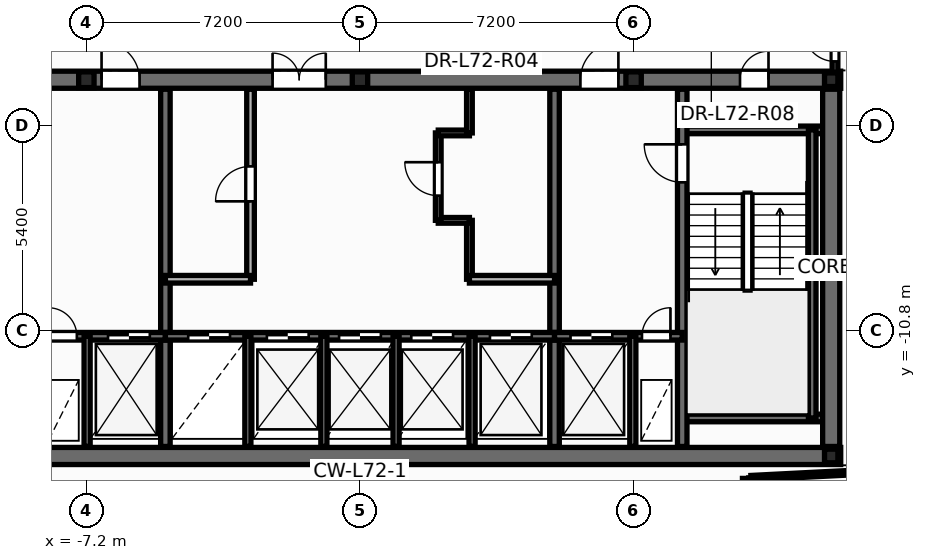
"""IFC4 building model, lengths in metres.
Left out: names, types, materials, properties, quantities, classifications, styles, units other than length and angle.
Written with IfcOpenShell. Run it as: python <this file> out.ifc"""

import sys

from ifc_helpers import new_model, si_unit, direction, frame, frame_2d, origin, origin_2d, place, context, subcontext, project, spatial, rectangle, hollow_circle, i_section, extrude, element, fill, save


model = new_model("IFC4")
c1 = context("Model", 3, precision=1e-05, world=origin(), true_north=direction((0.0, 1.0)))
c2 = subcontext(c1, "Body", "Model", "MODEL_VIEW")
j1 = project(units=[si_unit("LENGTHUNIT", "METRE"), si_unit("PLANEANGLEUNIT", "RADIAN")], contexts=[c1])
p1 = place(None, origin())
s1 = spatial("IfcSite", under=j1, at=p1, CompositionType="ELEMENT")
p2 = place(p1, origin())
s2 = spatial("IfcBuilding", under=s1, at=p2, CompositionType="ELEMENT")
p3 = place(p2, frame((0.0, 0.0, 274.2)))
s3 = spatial("IfcBuildingStorey", under=s2, at=p3, CompositionType="ELEMENT", Elevation=274.2)
p4 = place(p3, frame((10.293, -14.919, 0.0), z_axis=(0.0, 0.0, 1.0), x_axis=(1.0, 0.0, 0.0)))
e1 = element("IfcColumn", 1, at=p4, inside=s3, PredefinedType="COLUMN", context=c2, shape_type="SweptSolid", body=[
    extrude(hollow_circle(Radius=0.229, WallThickness=0.016, at=origin_2d()), origin(), (0.0, 0.0, 1.0), 3.6),
])
for number, where, z_axis, x_axis in (
    (2, (12.4, -14.1, 0.0), (0.0, 0.0, 1.0), (1.0, 0.0, 0.0)),
    (3, (12.4, -4.2, 0.0), (0.0, 0.0, 1.0), (1.0, 0.0, 0.0)),
):
    element("IfcColumn", number, at=place(p3, frame(where, z_axis=z_axis, x_axis=x_axis)), inside=s3, PredefinedType="COLUMN", context=c2, shape_type="SweptSolid", body=[
        extrude(i_section(OverallWidth=0.352, OverallDepth=0.359, WebThickness=0.018, FlangeThickness=0.026, at=origin_2d()), origin(), (0.0, 0.0, 1.0), 3.6),
    ])
for number, where, z_axis, x_axis in (
    (4, (-7.2, -4.2, 0.0), (0.0, 0.0, 1.0), (1.0, 0.0, 0.0)),
    (5, (0.0, -4.2, 0.0), (0.0, 0.0, 1.0), (1.0, 0.0, 0.0)),
    (6, (7.2, -4.2, 0.0), (0.0, 0.0, 1.0), (1.0, 0.0, 0.0)),
):
    element("IfcColumn", number, at=place(p3, frame(where, z_axis=z_axis, x_axis=x_axis)), inside=s3, PredefinedType="PILASTER", context=c2, shape_type="SweptSolid", body=[
        extrude(i_section(OverallWidth=0.405, OverallDepth=0.414, WebThickness=0.022, FlangeThickness=0.032, at=origin_2d()), origin(), (0.0, 0.0, 1.0), 3.6),
    ])
p5 = place(p3, frame((2.88, -9.45, 0.0), z_axis=(0.0, 0.0, 1.0), x_axis=(0.0, 1.0, 0.0)))
e7 = element("IfcWall", 7, at=p5, inside=s3, PredefinedType="PARTITIONING", context=c2, shape_type="SweptSolid", body=[
    extrude(rectangle(XDim=1.55, YDim=0.15, at=frame_2d((0.775, 0.0))), origin(), (0.0, 0.0, 1.0), 3.345),
])
p6 = place(p3, frame((2.06, -7.9, 0.0), z_axis=(0.0, 0.0, 1.0), x_axis=(1.0, 0.0, 0.0)))
e8 = element("IfcWall", 8, at=p6, inside=s3, PredefinedType="PARTITIONING", context=c2, shape_type="SweptSolid", body=[
    extrude(rectangle(XDim=0.82, YDim=0.15, at=frame_2d((0.41, 0.0))), origin(), (0.0, 0.0, 1.0), 3.345),
])
p7 = place(p3, frame((2.06, -7.9, 0.0), z_axis=(0.0, 0.0, 1.0), x_axis=(0.0, 1.0, 0.0)))
e9 = element("IfcWall", 9, at=p7, inside=s3, PredefinedType="PARTITIONING", context=c2, shape_type="SweptSolid", body=[
    extrude(rectangle(XDim=2.3, YDim=0.15, at=frame_2d((1.15, 0.0))), origin(), (0.0, 0.0, 1.0), 3.345),
])
p8 = place(p7, frame((0.65, 0.0, 0.0)))
e10 = element("IfcOpeningElement", 10, at=p8, cuts=e9, PredefinedType="OPENING", context=c2, shape_type="SweptSolid", body=[
    extrude(rectangle(XDim=0.886, YDim=2.104, at=frame_2d((0.44, 1.052))), frame((0.0, 0.085, 0.0), z_axis=(0.0, -1.0, 0.0), x_axis=(1.0, 0.0, 0.0)), (0.0, 0.0, 1.0), 0.17),
])
p9 = place(p3, frame((2.06, -5.6, 0.0), z_axis=(0.0, 0.0, 1.0), x_axis=(1.0, 0.0, 0.0)))
e11 = element("IfcWall", 11, at=p9, inside=s3, PredefinedType="PARTITIONING", context=c2, shape_type="SweptSolid", body=[
    extrude(rectangle(XDim=0.82, YDim=0.15, at=frame_2d((0.41, 0.0))), origin(), (0.0, 0.0, 1.0), 3.345),
])
p10 = place(p3, frame((2.88, -5.6, 0.0), z_axis=(0.0, 0.0, 1.0), x_axis=(0.0, 1.0, 0.0)))
e12 = element("IfcWall", 12, at=p10, inside=s3, PredefinedType="PARTITIONING", context=c2, shape_type="SweptSolid", body=[
    extrude(rectangle(XDim=1.15, YDim=0.15, at=frame_2d((0.575, 0.0))), origin(), (0.0, 0.0, 1.0), 3.345),
])
p11 = place(p3, frame((-12.65, -14.1, 0.0), z_axis=(0.0, 0.0, 1.0), x_axis=(1.0, 0.0, 0.0)))
e13 = element("IfcWall", 13, at=p11, inside=s3, PredefinedType="SHEAR", context=c2, shape_type="SweptSolid", body=[
    extrude(rectangle(XDim=25.3, YDim=0.45, at=frame_2d((12.65, 0.0))), origin(), (0.0, 0.0, 1.0), 3.6),
])
p12 = place(p3, frame((-12.65, -4.2, 0.0), z_axis=(0.0, 0.0, 1.0), x_axis=(1.0, 0.0, 0.0)))
e14 = element("IfcWall", 14, at=p12, inside=s3, PredefinedType="SHEAR", context=c2, shape_type="SweptSolid", body=[
    extrude(rectangle(XDim=25.3, YDim=0.45, at=frame_2d((12.65, 0.0))), origin(), (0.0, 0.0, 1.0), 3.6),
])
p13 = place(p12, frame((1.85, 0.0, 0.0)))
e15 = element("IfcOpeningElement", 15, at=p13, cuts=e14, PredefinedType="OPENING", context=c2, shape_type="SweptSolid", body=[
    extrude(rectangle(XDim=0.756, YDim=2.054, at=frame_2d((0.375, 1.027))), frame((0.0, 0.235, 0.0), z_axis=(0.0, -1.0, 0.0), x_axis=(1.0, 0.0, 0.0)), (0.0, 0.0, 1.0), 0.47),
])
p14 = place(p12, frame((22.65, 0.0, 0.0)))
e16 = element("IfcOpeningElement", 16, at=p14, cuts=e14, PredefinedType="OPENING", context=c2, shape_type="SweptSolid", body=[
    extrude(rectangle(XDim=0.756, YDim=2.054, at=frame_2d((0.375, 1.027))), frame((0.0, 0.235, 0.0), z_axis=(0.0, -1.0, 0.0), x_axis=(1.0, 0.0, 0.0)), (0.0, 0.0, 1.0), 0.47),
])
p15 = place(p12, frame((5.85, 0.0, 0.0)))
e17 = element("IfcOpeningElement", 17, at=p15, cuts=e14, PredefinedType="OPENING", context=c2, shape_type="SweptSolid", body=[
    extrude(rectangle(XDim=1.006, YDim=2.104, at=frame_2d((0.5, 1.052))), frame((0.0, 0.235, 0.0), z_axis=(0.0, -1.0, 0.0), x_axis=(1.0, 0.0, 0.0)), (0.0, 0.0, 1.0), 0.47),
])
p16 = place(p12, frame((10.35, 0.0, 0.0)))
e18 = element("IfcOpeningElement", 18, at=p16, cuts=e14, PredefinedType="OPENING", context=c2, shape_type="SweptSolid", body=[
    extrude(rectangle(XDim=1.406, YDim=2.154, at=frame_2d((0.7, 1.077))), frame((0.0, 0.235, 0.0), z_axis=(0.0, -1.0, 0.0), x_axis=(1.0, 0.0, 0.0)), (0.0, 0.0, 1.0), 0.47),
])
p17 = place(p12, frame((18.45, 0.0, 0.0)))
e19 = element("IfcOpeningElement", 19, at=p17, cuts=e14, PredefinedType="OPENING", context=c2, shape_type="SweptSolid", body=[
    extrude(rectangle(XDim=1.006, YDim=2.104, at=frame_2d((0.5, 1.052))), frame((0.0, 0.235, 0.0), z_axis=(0.0, -1.0, 0.0), x_axis=(1.0, 0.0, 0.0)), (0.0, 0.0, 1.0), 0.47),
])
for number, where, z_axis, x_axis in (
    (20, (8.48, -5.52, 0.0), (0.0, 0.0, 1.0), (1.0, 0.0, 0.0)),
    (21, (8.48, -13.1, 0.0), (0.0, 0.0, 1.0), (1.0, 0.0, 0.0)),
):
    element("IfcWall", number, at=place(p3, frame(where, z_axis=z_axis, x_axis=x_axis)), inside=s3, PredefinedType="SOLIDWALL", context=c2, shape_type="SweptSolid", body=[
        extrude(rectangle(XDim=3.87, YDim=0.2, at=frame_2d((1.935, 0.0))), origin(), (0.0, 0.0, 1.0), 3.6),
    ])
p18 = place(p3, frame((11.9, -13.1, 0.0), z_axis=(0.0, 0.0, 1.0), x_axis=(0.0, 1.0, 0.0)))
e22 = element("IfcWall", 22, at=p18, inside=s3, PredefinedType="SOLIDWALL", context=c2, shape_type="SweptSolid", body=[
    extrude(rectangle(XDim=7.58, YDim=0.2, at=frame_2d((3.79, 0.0))), origin(), (0.0, 0.0, 1.0), 3.6),
])
p19 = place(p3, frame((8.48, -13.85, 0.0), z_axis=(0.0, 0.0, 1.0), x_axis=(0.0, 1.0, 0.0)))
e23 = element("IfcWall", 23, at=p19, inside=s3, PredefinedType="SHEAR", context=c2, shape_type="SweptSolid", body=[
    extrude(rectangle(XDim=9.4, YDim=0.25, at=frame_2d((4.7, 0.0))), origin(), (0.0, 0.0, 1.0), 3.6),
])
p20 = place(p19, frame((6.95, 0.0, 0.0)))
e24 = element("IfcOpeningElement", 24, at=p20, cuts=e23, PredefinedType="OPENING", context=c2, shape_type="SweptSolid", body=[
    extrude(rectangle(XDim=1.006, YDim=2.104, at=frame_2d((0.5, 1.052))), frame((0.0, 0.135, 0.0), z_axis=(0.0, -1.0, 0.0), x_axis=(1.0, 0.0, 0.0)), (0.0, 0.0, 1.0), 0.27),
])
for number, where, z_axis, x_axis in (
    (25, (-5.12, -13.85, 0.0), (0.0, 0.0, 1.0), (0.0, 1.0, 0.0)),
    (26, (5.12, -13.85, 0.0), (0.0, 0.0, 1.0), (0.0, 1.0, 0.0)),
):
    element("IfcWall", number, at=place(p3, frame(where, z_axis=z_axis, x_axis=x_axis)), inside=s3, PredefinedType="SHEAR", context=c2, shape_type="SweptSolid", body=[
        extrude(rectangle(XDim=9.4, YDim=0.25, at=frame_2d((4.7, 0.0))), origin(), (0.0, 0.0, 1.0), 3.6),
    ])
p21 = place(p3, frame((-8.48, -10.95, 0.0), z_axis=(0.0, 0.0, 1.0), x_axis=(1.0, 0.0, 0.0)))
e27 = element("IfcWall", 27, at=p21, inside=s3, PredefinedType="SOLIDWALL", context=c2, shape_type="SweptSolid", body=[
    extrude(rectangle(XDim=3.36, YDim=0.2, at=frame_2d((1.68, 0.0))), origin(), (0.0, 0.0, 1.0), 3.6),
])
p22 = place(p21, frame((0.28, 0.0, 0.0)))
e28 = element("IfcOpeningElement", 28, at=p22, cuts=e27, PredefinedType="OPENING", context=c2, shape_type="SweptSolid", body=[
    extrude(rectangle(XDim=0.756, YDim=2.054, at=frame_2d((0.375, 1.027))), frame((0.0, 0.11, 0.0), z_axis=(0.0, -1.0, 0.0), x_axis=(1.0, 0.0, 0.0)), (0.0, 0.0, 1.0), 0.22),
])
p23 = place(p21, frame((1.85, 0.0, 0.0)))
e29 = element("IfcOpeningElement", 29, at=p23, cuts=e27, PredefinedType="OPENING", context=c2, shape_type="SweptSolid", body=[
    extrude(rectangle(XDim=1.106, YDim=2.104, at=frame_2d((0.55, 1.052))), frame((0.0, 0.11, 0.0), z_axis=(0.0, -1.0, 0.0), x_axis=(1.0, 0.0, 0.0)), (0.0, 0.0, 1.0), 0.22),
])
p24 = place(p3, frame((-5.12, -10.95, 0.0), z_axis=(0.0, 0.0, 1.0), x_axis=(1.0, 0.0, 0.0)))
e30 = element("IfcWall", 30, at=p24, inside=s3, PredefinedType="SOLIDWALL", context=c2, shape_type="SweptSolid", body=[
    extrude(rectangle(XDim=10.24, YDim=0.2, at=frame_2d((5.12, 0.0))), origin(), (0.0, 0.0, 1.0), 3.6),
])
p25 = place(p24, frame((0.6, 0.0, 0.0)))
e31 = element("IfcOpeningElement", 31, at=p25, cuts=e30, PredefinedType="OPENING", context=c2, shape_type="SweptSolid", body=[
    extrude(rectangle(XDim=1.106, YDim=2.104, at=frame_2d((0.55, 1.052))), frame((0.0, 0.11, 0.0), z_axis=(0.0, -1.0, 0.0), x_axis=(1.0, 0.0, 0.0)), (0.0, 0.0, 1.0), 0.22),
])
p26 = place(p24, frame((2.67, 0.0, 0.0)))
e32 = element("IfcOpeningElement", 32, at=p26, cuts=e30, PredefinedType="OPENING", context=c2, shape_type="SweptSolid", body=[
    extrude(rectangle(XDim=1.106, YDim=2.104, at=frame_2d((0.55, 1.052))), frame((0.0, 0.11, 0.0), z_axis=(0.0, -1.0, 0.0), x_axis=(1.0, 0.0, 0.0)), (0.0, 0.0, 1.0), 0.22),
])
p27 = place(p24, frame((4.57, 0.0, 0.0)))
e33 = element("IfcOpeningElement", 33, at=p27, cuts=e30, PredefinedType="OPENING", context=c2, shape_type="SweptSolid", body=[
    extrude(rectangle(XDim=1.106, YDim=2.104, at=frame_2d((0.55, 1.052))), frame((0.0, 0.11, 0.0), z_axis=(0.0, -1.0, 0.0), x_axis=(1.0, 0.0, 0.0)), (0.0, 0.0, 1.0), 0.22),
])
p28 = place(p24, frame((6.47, 0.0, 0.0)))
e34 = element("IfcOpeningElement", 34, at=p28, cuts=e30, PredefinedType="OPENING", context=c2, shape_type="SweptSolid", body=[
    extrude(rectangle(XDim=1.106, YDim=2.104, at=frame_2d((0.55, 1.052))), frame((0.0, 0.11, 0.0), z_axis=(0.0, -1.0, 0.0), x_axis=(1.0, 0.0, 0.0)), (0.0, 0.0, 1.0), 0.22),
])
p29 = place(p24, frame((8.54, 0.0, 0.0)))
e35 = element("IfcOpeningElement", 35, at=p29, cuts=e30, PredefinedType="OPENING", context=c2, shape_type="SweptSolid", body=[
    extrude(rectangle(XDim=1.106, YDim=2.104, at=frame_2d((0.55, 1.052))), frame((0.0, 0.11, 0.0), z_axis=(0.0, -1.0, 0.0), x_axis=(1.0, 0.0, 0.0)), (0.0, 0.0, 1.0), 0.22),
])
p30 = place(p3, frame((5.12, -10.95, 0.0), z_axis=(0.0, 0.0, 1.0), x_axis=(1.0, 0.0, 0.0)))
e36 = element("IfcWall", 36, at=p30, inside=s3, PredefinedType="SOLIDWALL", context=c2, shape_type="SweptSolid", body=[
    extrude(rectangle(XDim=3.36, YDim=0.2, at=frame_2d((1.68, 0.0))), origin(), (0.0, 0.0, 1.0), 3.6),
])
p31 = place(p30, frame((0.42, 0.0, 0.0)))
e37 = element("IfcOpeningElement", 37, at=p31, cuts=e36, PredefinedType="OPENING", context=c2, shape_type="SweptSolid", body=[
    extrude(rectangle(XDim=1.106, YDim=2.104, at=frame_2d((0.55, 1.052))), frame((0.0, 0.11, 0.0), z_axis=(0.0, -1.0, 0.0), x_axis=(1.0, 0.0, 0.0)), (0.0, 0.0, 1.0), 0.22),
])
p32 = place(p30, frame((2.3, 0.0, 0.0)))
e38 = element("IfcOpeningElement", 38, at=p32, cuts=e36, PredefinedType="OPENING", context=c2, shape_type="SweptSolid", body=[
    extrude(rectangle(XDim=0.756, YDim=2.054, at=frame_2d((0.375, 1.027))), frame((0.0, 0.11, 0.0), z_axis=(0.0, -1.0, 0.0), x_axis=(1.0, 0.0, 0.0)), (0.0, 0.0, 1.0), 0.22),
])
for number, where, z_axis, x_axis in (
    (39, (-7.18, -13.85, 0.0), (0.0, 0.0, 1.0), (0.0, 1.0, 0.0)),
    (40, (7.18, -13.85, 0.0), (0.0, 0.0, 1.0), (0.0, 1.0, 0.0)),
    (41, (-2.95, -13.85, 0.0), (0.0, 0.0, 1.0), (0.0, 1.0, 0.0)),
    (42, (2.95, -13.85, 0.0), (0.0, 0.0, 1.0), (0.0, 1.0, 0.0)),
):
    element("IfcWall", number, at=place(p3, frame(where, z_axis=z_axis, x_axis=x_axis)), inside=s3, PredefinedType="PARTITIONING", context=c2, shape_type="SweptSolid", body=[
        extrude(rectangle(XDim=2.9, YDim=0.16, at=frame_2d((1.45, 0.0))), origin(), (0.0, 0.0, 1.0), 2.57),
    ])
p33 = place(p3, frame((12.4, -13.85, 0.0), z_axis=(0.0, 0.0, 1.0), x_axis=(0.0, 1.0, 0.0)))
e43 = element("IfcWall", 43, at=p33, inside=s3, PredefinedType="SHEAR", context=c2, shape_type="SweptSolid", body=[
    extrude(rectangle(XDim=9.4, YDim=0.45, at=frame_2d((4.7, 0.0))), origin(), (0.0, 0.0, 1.0), 3.6),
])
p34 = place(p3, frame((-2.88, -9.45, 0.0), z_axis=(0.0, 0.0, 1.0), x_axis=(0.0, 1.0, 0.0)))
e44 = element("IfcWall", 44, at=p34, inside=s3, PredefinedType="SOLIDWALL", context=c2, shape_type="SweptSolid", body=[
    extrude(rectangle(XDim=5.0, YDim=0.2, at=frame_2d((2.5, 0.0))), origin(), (0.0, 0.0, 1.0), 3.345),
])
p35 = place(p34, frame((2.05, 0.0, 0.0)))
e45 = element("IfcOpeningElement", 45, at=p35, cuts=e44, PredefinedType="OPENING", context=c2, shape_type="SweptSolid", body=[
    extrude(rectangle(XDim=0.926, YDim=2.104, at=frame_2d((0.46, 1.052))), frame((0.0, 0.11, 0.0), z_axis=(0.0, -1.0, 0.0), x_axis=(1.0, 0.0, 0.0)), (0.0, 0.0, 1.0), 0.22),
])
for number, where, z_axis, x_axis in (
    (46, (-5.12, -9.45, 0.0), (0.0, 0.0, 1.0), (1.0, 0.0, 0.0)),
    (47, (2.88, -9.45, 0.0), (0.0, 0.0, 1.0), (1.0, 0.0, 0.0)),
):
    element("IfcWall", number, at=place(p3, frame(where, z_axis=z_axis, x_axis=x_axis)), inside=s3, PredefinedType="SOLIDWALL", context=c2, shape_type="SweptSolid", body=[
        extrude(rectangle(XDim=2.24, YDim=0.2, at=frame_2d((1.12, 0.0))), origin(), (0.0, 0.0, 1.0), 3.345),
    ])
for number, where, z_axis, x_axis in (
    (48, (-0.95, -13.85, 0.0), (0.0, 0.0, 1.0), (0.0, 1.0, 0.0)),
    (49, (0.95, -13.85, 0.0), (0.0, 0.0, 1.0), (0.0, 1.0, 0.0)),
):
    element("IfcWall", number, at=place(p3, frame(where, z_axis=z_axis, x_axis=x_axis)), inside=s3, PredefinedType="PARTITIONING", context=c2, shape_type="SweptSolid", body=[
        extrude(rectangle(XDim=2.9, YDim=0.16, at=frame_2d((1.45, 0.0))), origin(), (0.0, 0.0, 1.0), 2.57),
    ])
p36 = place(p3, frame((10.29, -14.672, 0.0), z_axis=(0.0, 0.0, 1.0), x_axis=(0.998709464059, 0.050787856814, 0.0)))
e50 = element("IfcWall", 50, at=p36, inside=s3, PredefinedType="PARTITIONING", context=c2, shape_type="SweptSolid", body=[
    extrude(rectangle(XDim=4.125, YDim=0.12, at=frame_2d((2.062, 0.0))), origin(), (0.0, 0.0, 1.0), 2.32),
])
p37 = place(p3, frame((12.5, -4.24, 0.0), z_axis=(0.0, 0.0, 1.0), x_axis=(0.0, 1.0, 0.0)))
e51 = element("IfcWall", 51, at=p37, inside=s3, PredefinedType="PARTITIONING", context=c2, shape_type="SweptSolid", body=[
    extrude(rectangle(XDim=1.48, YDim=0.15, at=frame_2d((0.74, 0.0))), origin(), (0.0, 0.0, 1.0), 2.32),
])
p38 = place(p37, frame((0.522, 0.0, 0.0)))
e52 = element("IfcOpeningElement", 52, at=p38, cuts=e51, PredefinedType="OPENING", context=c2, shape_type="SweptSolid", body=[
    extrude(rectangle(XDim=0.826, YDim=2.104, at=frame_2d((0.41, 1.052))), frame((0.0, 0.085, 0.0), z_axis=(0.0, -1.0, 0.0), x_axis=(1.0, 0.0, 0.0)), (0.0, 0.0, 1.0), 0.17),
])
p39 = place(p3, frame((10.323, -15.309, 0.0), z_axis=(0.0, 0.0, 1.0), x_axis=(-0.050930748048, 0.998702187293, 0.0)))
e53 = element("IfcWall", 53, at=p39, inside=s3, PredefinedType="PARTITIONING", context=c2, shape_type="SweptSolid", body=[
    extrude(rectangle(XDim=0.637, YDim=0.12, at=frame_2d((0.319, 0.0))), origin(), (0.0, 0.0, 1.0), 2.32),
])
p40 = place(p35, origin())
e54 = element("IfcDoor", 54, at=p40, inside=s3, OperationType="SINGLE_SWING_LEFT", PredefinedType="DOOR", context=c2, shape_type="SweptSolid", body=[
    extrude(rectangle(XDim=0.92, YDim=2.1, at=frame_2d((0.46, 1.05))), frame((0.0, 0.025, 0.0), z_axis=(0.0, -1.0, 0.0), x_axis=(1.0, 0.0, 0.0)), (0.0, 0.0, 1.0), 0.05),
])
fill(e45, e54)
p41 = place(p8, origin())
e55 = element("IfcDoor", 55, at=p41, inside=s3, OperationType="SINGLE_SWING_RIGHT", PredefinedType="DOOR", context=c2, shape_type="SweptSolid", body=[
    extrude(rectangle(XDim=0.88, YDim=2.1, at=frame_2d((0.44, 1.05))), frame((0.0, 0.025, 0.0), z_axis=(0.0, -1.0, 0.0), x_axis=(1.0, 0.0, 0.0)), (0.0, 0.0, 1.0), 0.05),
])
fill(e10, e55)
p42 = place(p20, origin())
e56 = element("IfcDoor", 56, at=p42, inside=s3, OperationType="SINGLE_SWING_RIGHT", PredefinedType="DOOR", context=c2, shape_type="SweptSolid", body=[
    extrude(rectangle(XDim=1.0, YDim=2.1, at=frame_2d((0.5, 1.05))), frame((0.0, 0.025, 0.0), z_axis=(0.0, -1.0, 0.0), x_axis=(1.0, 0.0, 0.0)), (0.0, 0.0, 1.0), 0.05),
])
fill(e24, e56)
p43 = place(p22, origin())
e57 = element("IfcDoor", 57, at=p43, inside=s3, OperationType="SINGLE_SWING_LEFT", PredefinedType="DOOR", context=c2, shape_type="SweptSolid", body=[
    extrude(rectangle(XDim=0.75, YDim=2.05, at=frame_2d((0.375, 1.025))), frame((0.0, 0.025, 0.0), z_axis=(0.0, -1.0, 0.0), x_axis=(1.0, 0.0, 0.0)), (0.0, 0.0, 1.0), 0.05),
])
fill(e28, e57)
p44 = place(p23, origin())
e58 = element("IfcDoor", 58, at=p44, inside=s3, OperationType="DOUBLE_DOOR_SLIDING", PredefinedType="DOOR", context=c2, shape_type="SweptSolid", body=[
    extrude(rectangle(XDim=1.1, YDim=2.1, at=frame_2d((0.55, 1.05))), frame((0.0, 0.025, 0.0), z_axis=(0.0, -1.0, 0.0), x_axis=(1.0, 0.0, 0.0)), (0.0, 0.0, 1.0), 0.05),
])
fill(e29, e58)
p45 = place(p31, origin())
e59 = element("IfcDoor", 59, at=p45, inside=s3, OperationType="DOUBLE_DOOR_SLIDING", PredefinedType="DOOR", context=c2, shape_type="SweptSolid", body=[
    extrude(rectangle(XDim=1.1, YDim=2.1, at=frame_2d((0.55, 1.05))), frame((0.0, 0.025, 0.0), z_axis=(0.0, -1.0, 0.0), x_axis=(1.0, 0.0, 0.0)), (0.0, 0.0, 1.0), 0.05),
])
fill(e37, e59)
p46 = place(p32, origin())
e60 = element("IfcDoor", 60, at=p46, inside=s3, OperationType="SINGLE_SWING_RIGHT", PredefinedType="DOOR", context=c2, shape_type="SweptSolid", body=[
    extrude(rectangle(XDim=0.75, YDim=2.05, at=frame_2d((0.375, 1.025))), frame((0.0, 0.025, 0.0), z_axis=(0.0, -1.0, 0.0), x_axis=(1.0, 0.0, 0.0)), (0.0, 0.0, 1.0), 0.05),
])
fill(e38, e60)
p47 = place(p25, origin())
e61 = element("IfcDoor", 61, at=p47, inside=s3, OperationType="DOUBLE_DOOR_SLIDING", PredefinedType="DOOR", context=c2, shape_type="SweptSolid", body=[
    extrude(rectangle(XDim=1.1, YDim=2.1, at=frame_2d((0.55, 1.05))), frame((0.0, 0.025, 0.0), z_axis=(0.0, -1.0, 0.0), x_axis=(1.0, 0.0, 0.0)), (0.0, 0.0, 1.0), 0.05),
])
fill(e31, e61)
p48 = place(p26, origin())
e62 = element("IfcDoor", 62, at=p48, inside=s3, OperationType="DOUBLE_DOOR_SLIDING", PredefinedType="DOOR", context=c2, shape_type="SweptSolid", body=[
    extrude(rectangle(XDim=1.1, YDim=2.1, at=frame_2d((0.55, 1.05))), frame((0.0, 0.025, 0.0), z_axis=(0.0, -1.0, 0.0), x_axis=(1.0, 0.0, 0.0)), (0.0, 0.0, 1.0), 0.05),
])
fill(e32, e62)
p49 = place(p27, origin())
e63 = element("IfcDoor", 63, at=p49, inside=s3, OperationType="DOUBLE_DOOR_SLIDING", PredefinedType="DOOR", context=c2, shape_type="SweptSolid", body=[
    extrude(rectangle(XDim=1.1, YDim=2.1, at=frame_2d((0.55, 1.05))), frame((0.0, 0.025, 0.0), z_axis=(0.0, -1.0, 0.0), x_axis=(1.0, 0.0, 0.0)), (0.0, 0.0, 1.0), 0.05),
])
fill(e33, e63)
p50 = place(p28, origin())
e64 = element("IfcDoor", 64, at=p50, inside=s3, OperationType="DOUBLE_DOOR_SLIDING", PredefinedType="DOOR", context=c2, shape_type="SweptSolid", body=[
    extrude(rectangle(XDim=1.1, YDim=2.1, at=frame_2d((0.55, 1.05))), frame((0.0, 0.025, 0.0), z_axis=(0.0, -1.0, 0.0), x_axis=(1.0, 0.0, 0.0)), (0.0, 0.0, 1.0), 0.05),
])
fill(e34, e64)
p51 = place(p29, origin())
e65 = element("IfcDoor", 65, at=p51, inside=s3, OperationType="DOUBLE_DOOR_SLIDING", PredefinedType="DOOR", context=c2, shape_type="SweptSolid", body=[
    extrude(rectangle(XDim=1.1, YDim=2.1, at=frame_2d((0.55, 1.05))), frame((0.0, 0.025, 0.0), z_axis=(0.0, -1.0, 0.0), x_axis=(1.0, 0.0, 0.0)), (0.0, 0.0, 1.0), 0.05),
])
fill(e35, e65)
p52 = place(p14, origin())
e66 = element("IfcDoor", 66, at=p52, inside=s3, OperationType="SINGLE_SWING_RIGHT", PredefinedType="DOOR", context=c2, shape_type="SweptSolid", body=[
    extrude(rectangle(XDim=0.75, YDim=2.05, at=frame_2d((0.375, 1.025))), frame((0.0, 0.025, 0.0), z_axis=(0.0, -1.0, 0.0), x_axis=(1.0, 0.0, 0.0)), (0.0, 0.0, 1.0), 0.05),
])
fill(e16, e66)
p53 = place(p15, origin())
e67 = element("IfcDoor", 67, at=p53, inside=s3, OperationType="SINGLE_SWING_LEFT", PredefinedType="DOOR", context=c2, shape_type="SweptSolid", body=[
    extrude(rectangle(XDim=1.0, YDim=2.1, at=frame_2d((0.5, 1.05))), frame((0.0, 0.025, 0.0), z_axis=(0.0, -1.0, 0.0), x_axis=(1.0, 0.0, 0.0)), (0.0, 0.0, 1.0), 0.05),
])
fill(e17, e67)
p54 = place(p16, origin())
e68 = element("IfcDoor", 68, at=p54, inside=s3, OperationType="DOUBLE_DOOR_SINGLE_SWING", PredefinedType="DOOR", context=c2, shape_type="SweptSolid", body=[
    extrude(rectangle(XDim=1.4, YDim=2.15, at=frame_2d((0.7, 1.075))), frame((0.0, 0.025, 0.0), z_axis=(0.0, -1.0, 0.0), x_axis=(1.0, 0.0, 0.0)), (0.0, 0.0, 1.0), 0.05),
])
fill(e18, e68)
p55 = place(p17, origin())
e69 = element("IfcDoor", 69, at=p55, inside=s3, OperationType="SINGLE_SWING_RIGHT", PredefinedType="DOOR", context=c2, shape_type="SweptSolid", body=[
    extrude(rectangle(XDim=1.0, YDim=2.1, at=frame_2d((0.5, 1.05))), frame((0.0, 0.025, 0.0), z_axis=(0.0, -1.0, 0.0), x_axis=(1.0, 0.0, 0.0)), (0.0, 0.0, 1.0), 0.05),
])
fill(e19, e69)
p56 = place(p38, origin())
e70 = element("IfcDoor", 70, at=p56, inside=s3, OperationType="SINGLE_SWING_RIGHT", PredefinedType="DOOR", context=c2, shape_type="SweptSolid", body=[
    extrude(rectangle(XDim=0.82, YDim=2.1, at=frame_2d((0.41, 1.05))), frame((0.0, 0.025, 0.0), z_axis=(0.0, -1.0, 0.0), x_axis=(1.0, 0.0, 0.0)), (0.0, 0.0, 1.0), 0.05),
])
fill(e52, e70)
save(model, sys.argv[1])
